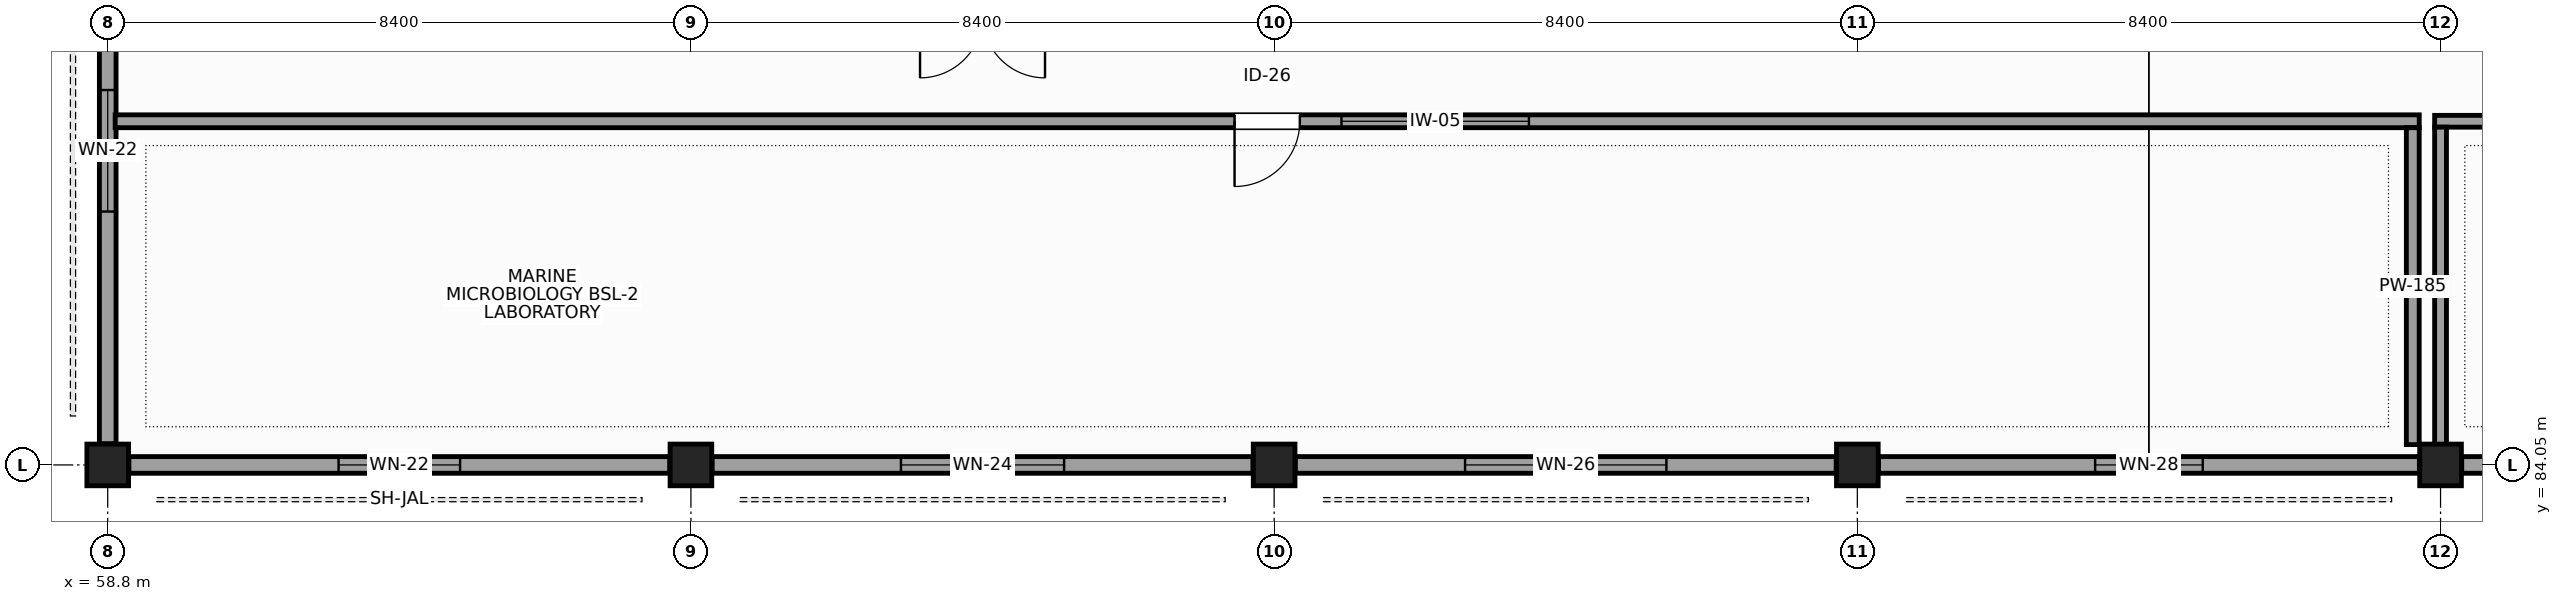
"""IFC4 building model, lengths in metres.
Left out: names, types, materials, properties, quantities, classifications, styles, units other than length and angle.
Written with IfcOpenShell. Run it as: python <this file> out.ifc"""

import sys

from ifc_helpers import new_model, si_unit, direction, frame, frame_2d, origin, origin_2d, place, context, subcontext, project, spatial, rectangle, extrude, element, fill, save


model = new_model("IFC4")
c1 = context("Model", 3, precision=1e-05, world=origin(), true_north=direction((0.0, 1.0)))
c2 = subcontext(c1, "Body", "Model", "MODEL_VIEW")
j1 = project(units=[si_unit("LENGTHUNIT", "METRE"), si_unit("PLANEANGLEUNIT", "RADIAN")], contexts=[c1])
p1 = place(None, origin())
s1 = spatial("IfcSite", under=j1, at=p1, CompositionType="ELEMENT")
p2 = place(p1, origin())
s2 = spatial("IfcBuilding", under=s1, at=p2, CompositionType="ELEMENT")
p3 = place(p2, frame((0.0, 0.0, 15.6)))
s3 = spatial("IfcBuildingStorey", under=s2, at=p3, CompositionType="ELEMENT", Elevation=15.6)
for number, where, z_axis, x_axis in (
    (1, (58.8, 84.05, 0.0), (0.0, 0.0, 1.0), (1.0, 0.0, 0.0)),
    (2, (67.2, 84.05, 0.0), (0.0, 0.0, 1.0), (1.0, 0.0, 0.0)),
    (3, (75.6, 84.05, 0.0), (0.0, 0.0, 1.0), (1.0, 0.0, 0.0)),
    (4, (84.0, 84.05, 0.0), (0.0, 0.0, 1.0), (1.0, 0.0, 0.0)),
    (5, (92.4, 84.05, 0.0), (0.0, 0.0, 1.0), (1.0, 0.0, 0.0)),
):
    element("IfcColumn", number, at=place(p3, frame(where, z_axis=z_axis, x_axis=x_axis)), inside=s3, PredefinedType="COLUMN", context=c2, shape_type="SweptSolid", body=[
        extrude(rectangle(XDim=0.6, YDim=0.6, at=origin_2d()), origin(), (0.0, 0.0, 1.0), 4.5),
    ])
p4 = place(p3, frame((58.8, 92.795, 0.0), z_axis=(0.0, 0.0, 1.0), x_axis=(0.0, -1.0, 0.0)))
e6 = element("IfcWall", 6, at=p4, inside=s3, PredefinedType="STANDARD", context=c2, shape_type="SweptSolid", body=[
    extrude(rectangle(XDim=8.44, YDim=0.24, at=frame_2d((4.22, 0.0))), origin(), (0.0, 0.0, 1.0), 3.35),
])
p5 = place(p4, frame((3.345, 0.0, 0.95)))
e7 = element("IfcOpeningElement", 7, at=p5, cuts=e6, PredefinedType="OPENING", context=c2, shape_type="SweptSolid", body=[
    extrude(rectangle(XDim=1.75, YDim=1.95, at=frame_2d((0.875, 0.975))), frame((0.0, 0.13, 0.0), z_axis=(0.0, -1.0, 0.0), x_axis=(1.0, 0.0, 0.0)), (0.0, 0.0, 1.0), 0.26),
])
p6 = place(p3, frame((59.105, 84.05, 0.0), z_axis=(0.0, 0.0, 1.0), x_axis=(1.0, 0.0, 0.0)))
e8 = element("IfcWall", 8, at=p6, inside=s3, PredefinedType="STANDARD", context=c2, shape_type="SweptSolid", body=[
    extrude(rectangle(XDim=7.79, YDim=0.24, at=frame_2d((3.895, 0.0))), origin(), (0.0, 0.0, 1.0), 3.33),
])
p7 = place(p6, frame((3.02, 0.0, 0.95)))
e9 = element("IfcOpeningElement", 9, at=p7, cuts=e8, PredefinedType="OPENING", context=c2, shape_type="SweptSolid", body=[
    extrude(rectangle(XDim=1.75, YDim=1.95, at=frame_2d((0.875, 0.975))), frame((0.0, 0.13, 0.0), z_axis=(0.0, -1.0, 0.0), x_axis=(1.0, 0.0, 0.0)), (0.0, 0.0, 1.0), 0.26),
])
p8 = place(p3, frame((67.505, 84.05, 0.0), z_axis=(0.0, 0.0, 1.0), x_axis=(1.0, 0.0, 0.0)))
e10 = element("IfcWall", 10, at=p8, inside=s3, PredefinedType="STANDARD", context=c2, shape_type="SweptSolid", body=[
    extrude(rectangle(XDim=7.79, YDim=0.24, at=frame_2d((3.895, 0.0))), origin(), (0.0, 0.0, 1.0), 3.33),
])
p9 = place(p8, frame((2.72, 0.0, 0.95)))
e11 = element("IfcOpeningElement", 11, at=p9, cuts=e10, PredefinedType="OPENING", context=c2, shape_type="SweptSolid", body=[
    extrude(rectangle(XDim=2.35, YDim=1.7, at=frame_2d((1.175, 0.85))), frame((0.0, 0.13, 0.0), z_axis=(0.0, -1.0, 0.0), x_axis=(1.0, 0.0, 0.0)), (0.0, 0.0, 1.0), 0.26),
])
p10 = place(p3, frame((75.905, 84.05, 0.0), z_axis=(0.0, 0.0, 1.0), x_axis=(1.0, 0.0, 0.0)))
e12 = element("IfcWall", 12, at=p10, inside=s3, PredefinedType="STANDARD", context=c2, shape_type="SweptSolid", body=[
    extrude(rectangle(XDim=7.79, YDim=0.24, at=frame_2d((3.895, 0.0))), origin(), (0.0, 0.0, 1.0), 3.33),
])
p11 = place(p10, frame((2.445, 0.0, 0.95)))
e13 = element("IfcOpeningElement", 13, at=p11, cuts=e12, PredefinedType="OPENING", context=c2, shape_type="SweptSolid", body=[
    extrude(rectangle(XDim=2.9, YDim=1.9, at=frame_2d((1.45, 0.95))), frame((0.0, 0.13, 0.0), z_axis=(0.0, -1.0, 0.0), x_axis=(1.0, 0.0, 0.0)), (0.0, 0.0, 1.0), 0.26),
])
p12 = place(p3, frame((84.305, 84.05, 0.0), z_axis=(0.0, 0.0, 1.0), x_axis=(1.0, 0.0, 0.0)))
e14 = element("IfcWall", 14, at=p12, inside=s3, PredefinedType="STANDARD", context=c2, shape_type="SweptSolid", body=[
    extrude(rectangle(XDim=7.79, YDim=0.24, at=frame_2d((3.895, 0.0))), origin(), (0.0, 0.0, 1.0), 3.33),
])
p13 = place(p12, frame((3.12, 0.0, 0.95)))
e15 = element("IfcOpeningElement", 15, at=p13, cuts=e14, PredefinedType="OPENING", context=c2, shape_type="SweptSolid", body=[
    extrude(rectangle(XDim=1.55, YDim=1.7, at=frame_2d((0.775, 0.85))), frame((0.0, 0.13, 0.0), z_axis=(0.0, -1.0, 0.0), x_axis=(1.0, 0.0, 0.0)), (0.0, 0.0, 1.0), 0.26),
])
p14 = place(p3, frame((92.705, 84.05, 0.0), z_axis=(0.0, 0.0, 1.0), x_axis=(1.0, 0.0, 0.0)))
e16 = element("IfcWall", 16, at=p14, inside=s3, PredefinedType="STANDARD", context=c2, shape_type="SweptSolid", body=[
    extrude(rectangle(XDim=7.79, YDim=0.24, at=frame_2d((3.895, 0.0))), origin(), (0.0, 0.0, 1.0), 3.33),
])
p15 = place(p3, frame((58.907, 89.0, 0.0), z_axis=(0.0, 0.0, 1.0), x_axis=(1.0, 0.0, 0.0)))
e17 = element("IfcWall", 17, at=p15, inside=s3, PredefinedType="PARTITIONING", context=c2, shape_type="SweptSolid", body=[
    extrude(rectangle(XDim=33.186, YDim=0.185, at=frame_2d((16.593, 0.0))), origin(), (0.0, 0.0, 1.0), 3.35),
])
p16 = place(p15, frame((16.123, 0.0, 0.0)))
e18 = element("IfcOpeningElement", 18, at=p16, cuts=e17, PredefinedType="OPENING", context=c2, shape_type="SweptSolid", body=[
    extrude(rectangle(XDim=0.94, YDim=2.14, at=frame_2d((0.47, 1.07))), frame((0.0, 0.103, 0.0), z_axis=(0.0, -1.0, 0.0), x_axis=(1.0, 0.0, 0.0)), (0.0, 0.0, 1.0), 0.205),
])
p17 = place(p15, frame((17.663, 0.0, 1.05)))
e19 = element("IfcOpeningElement", 19, at=p17, cuts=e17, PredefinedType="OPENING", context=c2, shape_type="SweptSolid", body=[
    extrude(rectangle(XDim=2.7, YDim=1.4, at=frame_2d((1.35, 0.7))), frame((0.0, 0.103, 0.0), z_axis=(0.0, -1.0, 0.0), x_axis=(1.0, 0.0, 0.0)), (0.0, 0.0, 1.0), 0.205),
])
p18 = place(p3, frame((92.0, 84.343, 0.0), z_axis=(0.0, 0.0, 1.0), x_axis=(0.0, 1.0, 0.0)))
e20 = element("IfcWall", 20, at=p18, inside=s3, PredefinedType="PARTITIONING", context=c2, shape_type="SweptSolid", body=[
    extrude(rectangle(XDim=4.564, YDim=0.185, at=frame_2d((2.282, 0.0))), origin(), (0.0, 0.0, 1.0), 3.33),
])
p19 = place(p3, frame((92.315, 89.0, 0.0), z_axis=(0.0, 0.0, 1.0), x_axis=(1.0, 0.0, 0.0)))
e21 = element("IfcWall", 21, at=p19, inside=s3, PredefinedType="PARTITIONING", context=c2, shape_type="SweptSolid", body=[
    extrude(rectangle(XDim=16.57, YDim=0.17, at=frame_2d((8.285, 0.0))), origin(), (0.0, 0.0, 1.0), 3.45),
])
p20 = place(p19, frame((7.745, 0.0, 0.0)))
e22 = element("IfcOpeningElement", 22, at=p20, cuts=e21, PredefinedType="OPENING", context=c2, shape_type="SweptSolid", body=[
    extrude(rectangle(XDim=1.08, YDim=2.22, at=frame_2d((0.54, 1.11))), frame((0.0, 0.095, 0.0), z_axis=(0.0, -1.0, 0.0), x_axis=(1.0, 0.0, 0.0)), (0.0, 0.0, 1.0), 0.19),
])
p21 = place(p19, frame((9.425, 0.0, 1.05)))
e23 = element("IfcOpeningElement", 23, at=p21, cuts=e21, PredefinedType="OPENING", context=c2, shape_type="SweptSolid", body=[
    extrude(rectangle(XDim=3.0, YDim=1.45, at=frame_2d((1.5, 0.725))), frame((0.0, 0.095, 0.0), z_axis=(0.0, -1.0, 0.0), x_axis=(1.0, 0.0, 0.0)), (0.0, 0.0, 1.0), 0.19),
])
p22 = place(p3, frame((92.4, 84.335, 0.0), z_axis=(0.0, 0.0, 1.0), x_axis=(0.0, 1.0, 0.0)))
e24 = element("IfcWall", 24, at=p22, inside=s3, PredefinedType="PARTITIONING", context=c2, shape_type="SweptSolid", body=[
    extrude(rectangle(XDim=4.58, YDim=0.17, at=frame_2d((2.29, 0.0))), origin(), (0.0, 0.0, 1.0), 3.33),
])
p23 = place(p5, origin())
e25 = element("IfcWindow", 25, at=p23, inside=s3, PartitioningType="SINGLE_PANEL", PredefinedType="WINDOW", context=c2, shape_type="SweptSolid", body=[
    extrude(rectangle(XDim=1.75, YDim=1.95, at=frame_2d((0.875, 0.975))), frame((0.0, 0.03, 0.0), z_axis=(0.0, -1.0, 0.0), x_axis=(1.0, 0.0, 0.0)), (0.0, 0.0, 1.0), 0.06),
])
fill(e7, e25)
p24 = place(p7, origin())
e26 = element("IfcWindow", 26, at=p24, inside=s3, PartitioningType="SINGLE_PANEL", PredefinedType="WINDOW", context=c2, shape_type="SweptSolid", body=[
    extrude(rectangle(XDim=1.75, YDim=1.95, at=frame_2d((0.875, 0.975))), frame((0.0, 0.03, 0.0), z_axis=(0.0, -1.0, 0.0), x_axis=(1.0, 0.0, 0.0)), (0.0, 0.0, 1.0), 0.06),
])
fill(e9, e26)
p25 = place(p9, origin())
e27 = element("IfcWindow", 27, at=p25, inside=s3, PartitioningType="SINGLE_PANEL", PredefinedType="WINDOW", context=c2, shape_type="SweptSolid", body=[
    extrude(rectangle(XDim=2.35, YDim=1.7, at=frame_2d((1.175, 0.85))), frame((0.0, 0.03, 0.0), z_axis=(0.0, -1.0, 0.0), x_axis=(1.0, 0.0, 0.0)), (0.0, 0.0, 1.0), 0.06),
])
fill(e11, e27)
p26 = place(p11, origin())
e28 = element("IfcWindow", 28, at=p26, inside=s3, PartitioningType="SINGLE_PANEL", PredefinedType="WINDOW", context=c2, shape_type="SweptSolid", body=[
    extrude(rectangle(XDim=2.9, YDim=1.9, at=frame_2d((1.45, 0.95))), frame((0.0, 0.03, 0.0), z_axis=(0.0, -1.0, 0.0), x_axis=(1.0, 0.0, 0.0)), (0.0, 0.0, 1.0), 0.06),
])
fill(e13, e28)
p27 = place(p13, origin())
e29 = element("IfcWindow", 29, at=p27, inside=s3, PartitioningType="SINGLE_PANEL", PredefinedType="WINDOW", context=c2, shape_type="SweptSolid", body=[
    extrude(rectangle(XDim=1.55, YDim=1.7, at=frame_2d((0.775, 0.85))), frame((0.0, 0.03, 0.0), z_axis=(0.0, -1.0, 0.0), x_axis=(1.0, 0.0, 0.0)), (0.0, 0.0, 1.0), 0.06),
])
fill(e15, e29)
p28 = place(p16, frame((0.94, 0.0, 0.0), z_axis=(0.0, 0.0, 1.0), x_axis=(-1.0, 0.0, 0.0)))
e30 = element("IfcDoor", 30, at=p28, inside=s3, OperationType="SINGLE_SWING_RIGHT", PredefinedType="DOOR", context=c2, shape_type="SweptSolid", body=[
    extrude(rectangle(XDim=0.94, YDim=2.14, at=frame_2d((0.47, 1.07))), frame((0.0, 0.025, 0.0), z_axis=(0.0, -1.0, 0.0), x_axis=(1.0, 0.0, 0.0)), (0.0, 0.0, 1.0), 0.05),
])
fill(e18, e30)
p29 = place(p17, origin())
e31 = element("IfcWindow", 31, at=p29, inside=s3, PartitioningType="SINGLE_PANEL", PredefinedType="WINDOW", context=c2, shape_type="SweptSolid", body=[
    extrude(rectangle(XDim=2.7, YDim=1.4, at=frame_2d((1.35, 0.7))), frame((0.0, 0.03, 0.0), z_axis=(0.0, -1.0, 0.0), x_axis=(1.0, 0.0, 0.0)), (0.0, 0.0, 1.0), 0.06),
])
fill(e19, e31)
save(model, sys.argv[1])
